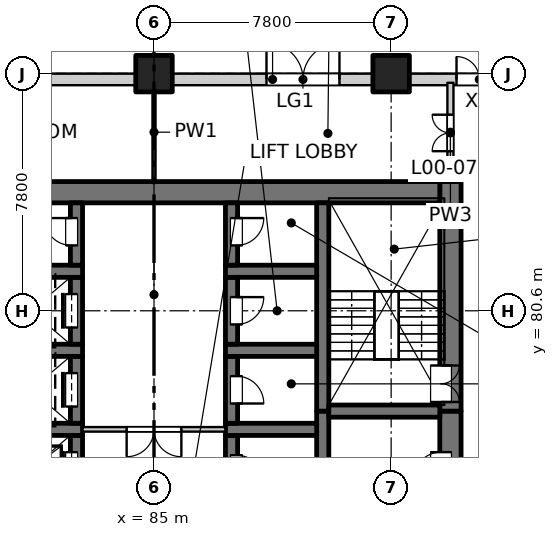
"""IFC4 building model, lengths in metres.
Left out: names, types, materials, properties, quantities, classifications, styles, units other than length and angle.
Written with IfcOpenShell. Run it as: python <this file> out.ifc"""

import sys

from ifc_helpers import new_model, si_unit, direction, frame, frame_2d, origin, origin_2d, place, context, subcontext, project, spatial, rectangle, extrude, element, fill, save


model = new_model("IFC4")
c1 = context("Model", 3, precision=1e-05, world=origin(), true_north=direction((0.0, 1.0)))
c2 = subcontext(c1, "Body", "Model", "MODEL_VIEW")
j1 = project(units=[si_unit("LENGTHUNIT", "METRE"), si_unit("PLANEANGLEUNIT", "RADIAN")], contexts=[c1])
p1 = place(None, origin())
s1 = spatial("IfcSite", under=j1, at=p1, CompositionType="ELEMENT")
p2 = place(p1, origin())
s2 = spatial("IfcBuilding", under=s1, at=p2, CompositionType="ELEMENT")
p3 = place(p2, origin())
s3 = spatial("IfcBuildingStorey", under=s2, at=p3, CompositionType="ELEMENT", Elevation=0.0)
for number, where, z_axis, x_axis in (
    (1, (85.0, 88.4, -0.4), (0.0, 0.0, 1.0), (1.0, 0.0, 0.0)),
    (2, (92.8, 88.4, -0.4), (0.0, 0.0, 1.0), (1.0, 0.0, 0.0)),
):
    element("IfcColumn", number, at=place(p3, frame(where, z_axis=z_axis, x_axis=x_axis)), inside=s3, PredefinedType="COLUMN", context=c2, shape_type="SweptSolid", body=[
        extrude(rectangle(XDim=1.2, YDim=1.2, at=origin_2d()), origin(), (0.0, 0.0, 1.0), 6.1),
    ])
p4 = place(p3, frame((94.75, 61.95, -0.4), z_axis=(0.0, 0.0, 1.0), x_axis=(0.0, 1.0, 0.0)))
e3 = element("IfcWall", 3, at=p4, inside=s3, PredefinedType="SOLIDWALL", context=c2, shape_type="SweptSolid", body=[
    extrude(rectangle(XDim=15.35, YDim=0.7, at=frame_2d((7.675, 0.0))), origin(), (0.0, 0.0, 1.0), 6.1),
])
p5 = place(p4, frame((0.925, 0.0, 0.4)))
e4 = element("IfcOpeningElement", 4, at=p5, cuts=e3, PredefinedType="OPENING", context=c2, shape_type="SweptSolid", body=[
    extrude(rectangle(XDim=0.9, YDim=2.1, at=frame_2d((0.45, 1.05))), frame((0.0, 0.36, 0.0), z_axis=(0.0, -1.0, 0.0), x_axis=(1.0, 0.0, 0.0)), (0.0, 0.0, 1.0), 0.72),
])
p6 = place(p4, frame((6.8, 0.0, 0.4)))
e5 = element("IfcOpeningElement", 5, at=p6, cuts=e3, PredefinedType="OPENING", context=c2, shape_type="SweptSolid", body=[
    extrude(rectangle(XDim=0.9, YDim=2.1, at=frame_2d((0.45, 1.05))), frame((0.0, 0.36, 0.0), z_axis=(0.0, -1.0, 0.0), x_axis=(1.0, 0.0, 0.0)), (0.0, 0.0, 1.0), 0.72),
])
p7 = place(p4, frame((13.1, 0.0, 0.4)))
e6 = element("IfcOpeningElement", 6, at=p7, cuts=e3, PredefinedType="OPENING", context=c2, shape_type="SweptSolid", body=[
    extrude(rectangle(XDim=0.9, YDim=2.1, at=frame_2d((0.45, 1.05))), frame((0.0, 0.36, 0.0), z_axis=(0.0, -1.0, 0.0), x_axis=(1.0, 0.0, 0.0)), (0.0, 0.0, 1.0), 0.72),
])
p8 = place(p3, frame((94.75, 77.3, -0.4), z_axis=(0.0, 0.0, 1.0), x_axis=(0.0, 1.0, 0.0)))
e7 = element("IfcWall", 7, at=p8, inside=s3, PredefinedType="SOLIDWALL", context=c2, shape_type="SweptSolid", body=[
    extrude(rectangle(XDim=7.55, YDim=0.7, at=frame_2d((3.775, 0.0))), origin(), (0.0, 0.0, 1.0), 6.1),
])
p9 = place(p8, frame((0.3, 0.0, 0.4)))
e8 = element("IfcOpeningElement", 8, at=p9, cuts=e7, PredefinedType="OPENING", context=c2, shape_type="SweptSolid", body=[
    extrude(rectangle(XDim=1.2, YDim=2.1, at=frame_2d((0.6, 1.05))), frame((0.0, 0.36, 0.0), z_axis=(0.0, -1.0, 0.0), x_axis=(1.0, 0.0, 0.0)), (0.0, 0.0, 1.0), 0.72),
])
p10 = place(p3, frame((75.6, 84.5, -0.4), z_axis=(0.0, 0.0, 1.0), x_axis=(1.0, 0.0, 0.0)))
e9 = element("IfcWall", 9, at=p10, inside=s3, PredefinedType="SOLIDWALL", context=c2, shape_type="SweptSolid", body=[
    extrude(rectangle(XDim=18.8, YDim=0.7, at=frame_2d((9.4, 0.0))), origin(), (0.0, 0.0, 1.0), 6.1),
])
p11 = place(p3, frame((90.55, 61.95, -0.4), z_axis=(0.0, 0.0, 1.0), x_axis=(0.0, 1.0, 0.0)))
e10 = element("IfcWall", 10, at=p11, inside=s3, PredefinedType="SOLIDWALL", context=c2, shape_type="SweptSolid", body=[
    extrude(rectangle(XDim=15.35, YDim=0.4, at=frame_2d((7.675, 0.0))), origin(), (0.0, 0.0, 1.0), 6.1),
])
p12 = place(p3, frame((90.55, 77.3, -0.4), z_axis=(0.0, 0.0, 1.0), x_axis=(0.0, 1.0, 0.0)))
e11 = element("IfcWall", 11, at=p12, inside=s3, PredefinedType="SOLIDWALL", context=c2, shape_type="SweptSolid", body=[
    extrude(rectangle(XDim=6.85, YDim=0.4, at=frame_2d((3.425, 0.0))), origin(), (0.0, 0.0, 1.0), 6.1),
])
p13 = place(p3, frame((82.45, 74.3, -0.4), z_axis=(0.0, 0.0, 1.0), x_axis=(0.0, 1.0, 0.0)))
e12 = element("IfcWall", 12, at=p13, inside=s3, PredefinedType="SOLIDWALL", context=c2, shape_type="SweptSolid", body=[
    extrude(rectangle(XDim=2.2, YDim=0.4, at=frame_2d((1.1, 0.0))), origin(), (0.0, 0.0, 1.0), 6.1),
])
p14 = place(p13, frame((0.55, 0.0, 0.4)))
e13 = element("IfcOpeningElement", 13, at=p14, cuts=e12, PredefinedType="OPENING", context=c2, shape_type="SweptSolid", body=[
    extrude(rectangle(XDim=1.1, YDim=2.1, at=frame_2d((0.55, 1.05))), frame((0.0, 0.21, 0.0), z_axis=(0.0, -1.0, 0.0), x_axis=(1.0, 0.0, 0.0)), (0.0, 0.0, 1.0), 0.42),
])
p15 = place(p3, frame((79.65, 76.7, -0.4), z_axis=(0.0, 0.0, 1.0), x_axis=(1.0, 0.0, 0.0)))
e14 = element("IfcWall", 14, at=p15, inside=s3, PredefinedType="SOLIDWALL", context=c2, shape_type="SweptSolid", body=[
    extrude(rectangle(XDim=3.0, YDim=0.4, at=frame_2d((1.5, 0.0))), origin(), (0.0, 0.0, 1.0), 6.1),
])
p16 = place(p3, frame((82.45, 76.9, -0.4), z_axis=(0.0, 0.0, 1.0), x_axis=(0.0, 1.0, 0.0)))
e15 = element("IfcWall", 15, at=p16, inside=s3, PredefinedType="SOLIDWALL", context=c2, shape_type="SweptSolid", body=[
    extrude(rectangle(XDim=2.2, YDim=0.4, at=frame_2d((1.1, 0.0))), origin(), (0.0, 0.0, 1.0), 6.1),
])
p17 = place(p16, frame((0.55, 0.0, 0.4)))
e16 = element("IfcOpeningElement", 16, at=p17, cuts=e15, PredefinedType="OPENING", context=c2, shape_type="SweptSolid", body=[
    extrude(rectangle(XDim=1.1, YDim=2.1, at=frame_2d((0.55, 1.05))), frame((0.0, 0.21, 0.0), z_axis=(0.0, -1.0, 0.0), x_axis=(1.0, 0.0, 0.0)), (0.0, 0.0, 1.0), 0.42),
])
p18 = place(p3, frame((79.65, 79.3, -0.4), z_axis=(0.0, 0.0, 1.0), x_axis=(1.0, 0.0, 0.0)))
e17 = element("IfcWall", 17, at=p18, inside=s3, PredefinedType="SOLIDWALL", context=c2, shape_type="SweptSolid", body=[
    extrude(rectangle(XDim=3.0, YDim=0.4, at=frame_2d((1.5, 0.0))), origin(), (0.0, 0.0, 1.0), 6.1),
])
p19 = place(p3, frame((82.45, 79.5, -0.4), z_axis=(0.0, 0.0, 1.0), x_axis=(0.0, 1.0, 0.0)))
e18 = element("IfcWall", 18, at=p19, inside=s3, PredefinedType="SOLIDWALL", context=c2, shape_type="SweptSolid", body=[
    extrude(rectangle(XDim=2.2, YDim=0.4, at=frame_2d((1.1, 0.0))), origin(), (0.0, 0.0, 1.0), 6.1),
])
p20 = place(p19, frame((0.55, 0.0, 0.4)))
e19 = element("IfcOpeningElement", 19, at=p20, cuts=e18, PredefinedType="OPENING", context=c2, shape_type="SweptSolid", body=[
    extrude(rectangle(XDim=1.1, YDim=2.1, at=frame_2d((0.55, 1.05))), frame((0.0, 0.21, 0.0), z_axis=(0.0, -1.0, 0.0), x_axis=(1.0, 0.0, 0.0)), (0.0, 0.0, 1.0), 0.42),
])
p21 = place(p3, frame((79.65, 81.9, -0.4), z_axis=(0.0, 0.0, 1.0), x_axis=(1.0, 0.0, 0.0)))
e20 = element("IfcWall", 20, at=p21, inside=s3, PredefinedType="SOLIDWALL", context=c2, shape_type="SweptSolid", body=[
    extrude(rectangle(XDim=3.0, YDim=0.4, at=frame_2d((1.5, 0.0))), origin(), (0.0, 0.0, 1.0), 6.1),
])
p22 = place(p3, frame((82.45, 82.1, -0.4), z_axis=(0.0, 0.0, 1.0), x_axis=(0.0, 1.0, 0.0)))
e21 = element("IfcWall", 21, at=p22, inside=s3, PredefinedType="SOLIDWALL", context=c2, shape_type="SweptSolid", body=[
    extrude(rectangle(XDim=2.05, YDim=0.4, at=frame_2d((1.025, 0.0))), origin(), (0.0, 0.0, 1.0), 6.1),
])
p23 = place(p22, frame((0.65, 0.0, 0.4)))
e22 = element("IfcOpeningElement", 22, at=p23, cuts=e21, PredefinedType="OPENING", context=c2, shape_type="SweptSolid", body=[
    extrude(rectangle(XDim=0.9, YDim=2.1, at=frame_2d((0.45, 1.05))), frame((0.0, 0.21, 0.0), z_axis=(0.0, -1.0, 0.0), x_axis=(1.0, 0.0, 0.0)), (0.0, 0.0, 1.0), 0.42),
])
p24 = place(p3, frame((87.55, 74.3, -0.4), z_axis=(0.0, 0.0, 1.0), x_axis=(0.0, 1.0, 0.0)))
e23 = element("IfcWall", 23, at=p24, inside=s3, PredefinedType="SOLIDWALL", context=c2, shape_type="SweptSolid", body=[
    extrude(rectangle(XDim=2.2, YDim=0.4, at=frame_2d((1.1, 0.0))), origin(), (0.0, 0.0, 1.0), 6.1),
])
p25 = place(p24, frame((0.65, 0.0, 0.4)))
e24 = element("IfcOpeningElement", 24, at=p25, cuts=e23, PredefinedType="OPENING", context=c2, shape_type="SweptSolid", body=[
    extrude(rectangle(XDim=0.9, YDim=2.1, at=frame_2d((0.45, 1.05))), frame((0.0, 0.21, 0.0), z_axis=(0.0, -1.0, 0.0), x_axis=(1.0, 0.0, 0.0)), (0.0, 0.0, 1.0), 0.42),
])
p26 = place(p3, frame((87.35, 76.7, -0.4), z_axis=(0.0, 0.0, 1.0), x_axis=(1.0, 0.0, 0.0)))
e25 = element("IfcWall", 25, at=p26, inside=s3, PredefinedType="SOLIDWALL", context=c2, shape_type="SweptSolid", body=[
    extrude(rectangle(XDim=3.0, YDim=0.4, at=frame_2d((1.5, 0.0))), origin(), (0.0, 0.0, 1.0), 6.1),
])
p27 = place(p3, frame((87.55, 76.9, -0.4), z_axis=(0.0, 0.0, 1.0), x_axis=(0.0, 1.0, 0.0)))
e26 = element("IfcWall", 26, at=p27, inside=s3, PredefinedType="SOLIDWALL", context=c2, shape_type="SweptSolid", body=[
    extrude(rectangle(XDim=2.2, YDim=0.4, at=frame_2d((1.1, 0.0))), origin(), (0.0, 0.0, 1.0), 6.1),
])
p28 = place(p27, frame((0.65, 0.0, 0.4)))
e27 = element("IfcOpeningElement", 27, at=p28, cuts=e26, PredefinedType="OPENING", context=c2, shape_type="SweptSolid", body=[
    extrude(rectangle(XDim=0.9, YDim=2.1, at=frame_2d((0.45, 1.05))), frame((0.0, 0.21, 0.0), z_axis=(0.0, -1.0, 0.0), x_axis=(1.0, 0.0, 0.0)), (0.0, 0.0, 1.0), 0.42),
])
p29 = place(p3, frame((87.35, 79.3, -0.4), z_axis=(0.0, 0.0, 1.0), x_axis=(1.0, 0.0, 0.0)))
e28 = element("IfcWall", 28, at=p29, inside=s3, PredefinedType="SOLIDWALL", context=c2, shape_type="SweptSolid", body=[
    extrude(rectangle(XDim=3.0, YDim=0.4, at=frame_2d((1.5, 0.0))), origin(), (0.0, 0.0, 1.0), 6.1),
])
p30 = place(p3, frame((87.55, 79.5, -0.4), z_axis=(0.0, 0.0, 1.0), x_axis=(0.0, 1.0, 0.0)))
e29 = element("IfcWall", 29, at=p30, inside=s3, PredefinedType="SOLIDWALL", context=c2, shape_type="SweptSolid", body=[
    extrude(rectangle(XDim=2.2, YDim=0.4, at=frame_2d((1.1, 0.0))), origin(), (0.0, 0.0, 1.0), 6.1),
])
p31 = place(p30, frame((0.65, 0.0, 0.4)))
e30 = element("IfcOpeningElement", 30, at=p31, cuts=e29, PredefinedType="OPENING", context=c2, shape_type="SweptSolid", body=[
    extrude(rectangle(XDim=0.9, YDim=2.1, at=frame_2d((0.45, 1.05))), frame((0.0, 0.21, 0.0), z_axis=(0.0, -1.0, 0.0), x_axis=(1.0, 0.0, 0.0)), (0.0, 0.0, 1.0), 0.42),
])
p32 = place(p3, frame((87.35, 81.9, -0.4), z_axis=(0.0, 0.0, 1.0), x_axis=(1.0, 0.0, 0.0)))
e31 = element("IfcWall", 31, at=p32, inside=s3, PredefinedType="SOLIDWALL", context=c2, shape_type="SweptSolid", body=[
    extrude(rectangle(XDim=3.0, YDim=0.4, at=frame_2d((1.5, 0.0))), origin(), (0.0, 0.0, 1.0), 6.1),
])
p33 = place(p3, frame((87.55, 82.1, -0.4), z_axis=(0.0, 0.0, 1.0), x_axis=(0.0, 1.0, 0.0)))
e32 = element("IfcWall", 32, at=p33, inside=s3, PredefinedType="SOLIDWALL", context=c2, shape_type="SweptSolid", body=[
    extrude(rectangle(XDim=2.05, YDim=0.4, at=frame_2d((1.025, 0.0))), origin(), (0.0, 0.0, 1.0), 6.1),
])
p34 = place(p33, frame((0.65, 0.0, 0.4)))
e33 = element("IfcOpeningElement", 33, at=p34, cuts=e32, PredefinedType="OPENING", context=c2, shape_type="SweptSolid", body=[
    extrude(rectangle(XDim=0.9, YDim=2.1, at=frame_2d((0.45, 1.05))), frame((0.0, 0.21, 0.0), z_axis=(0.0, -1.0, 0.0), x_axis=(1.0, 0.0, 0.0)), (0.0, 0.0, 1.0), 0.42),
])
p35 = place(p3, frame((90.75, 77.3, -0.4), z_axis=(0.0, 0.0, 1.0), x_axis=(1.0, 0.0, 0.0)))
e34 = element("IfcWall", 34, at=p35, inside=s3, PredefinedType="SOLIDWALL", context=c2, shape_type="SweptSolid", body=[
    extrude(rectangle(XDim=3.65, YDim=0.4, at=frame_2d((1.825, 0.0))), origin(), (0.0, 0.0, 1.0), 6.1),
])
p36 = place(p3, frame((77.8, 88.21, 0.0), z_axis=(0.0, 0.0, 1.0), x_axis=(1.0, 0.0, 0.0)))
e35 = element("IfcWall", 35, at=p36, inside=s3, PredefinedType="SOLIDWALL", context=c2, shape_type="SweptSolid", body=[
    extrude(rectangle(XDim=6.6, YDim=0.38, at=frame_2d((3.3, 0.0))), origin(), (0.0, 0.0, 1.0), 5.7),
])
p37 = place(p3, frame((85.6, 88.21, 0.0), z_axis=(0.0, 0.0, 1.0), x_axis=(1.0, 0.0, 0.0)))
e36 = element("IfcWall", 36, at=p37, inside=s3, PredefinedType="SOLIDWALL", context=c2, shape_type="SweptSolid", body=[
    extrude(rectangle(XDim=6.6, YDim=0.38, at=frame_2d((3.3, 0.0))), origin(), (0.0, 0.0, 1.0), 5.7),
])
p38 = place(p37, frame((3.1, 0.0, 0.0)))
e37 = element("IfcOpeningElement", 37, at=p38, cuts=e36, PredefinedType="OPENING", context=c2, shape_type="SweptSolid", body=[
    extrude(rectangle(XDim=2.4, YDim=2.7, at=frame_2d((1.2, 1.35))), frame((0.0, 0.2, 0.0), z_axis=(0.0, -1.0, 0.0), x_axis=(1.0, 0.0, 0.0)), (0.0, 0.0, 1.0), 0.4),
])
p39 = place(p3, frame((93.4, 88.21, 0.0), z_axis=(0.0, 0.0, 1.0), x_axis=(1.0, 0.0, 0.0)))
e38 = element("IfcWall", 38, at=p39, inside=s3, PredefinedType="SOLIDWALL", context=c2, shape_type="SweptSolid", body=[
    extrude(rectangle(XDim=6.6, YDim=0.38, at=frame_2d((3.3, 0.0))), origin(), (0.0, 0.0, 1.0), 5.7),
])
p40 = place(p39, frame((1.55, 0.0, 0.0)))
e39 = element("IfcOpeningElement", 39, at=p40, cuts=e38, PredefinedType="OPENING", context=c2, shape_type="SweptSolid", body=[
    extrude(rectangle(XDim=1.5, YDim=2.4, at=frame_2d((0.75, 1.2))), frame((0.0, 0.2, 0.0), z_axis=(0.0, -1.0, 0.0), x_axis=(1.0, 0.0, 0.0)), (0.0, 0.0, 1.0), 0.4),
])
p41 = place(p3, frame((82.65, 76.7, 0.0), z_axis=(0.0, 0.0, 1.0), x_axis=(1.0, 0.0, 0.0)))
e40 = element("IfcWall", 40, at=p41, inside=s3, PredefinedType="PARTITIONING", context=c2, shape_type="SweptSolid", body=[
    extrude(rectangle(XDim=4.7, YDim=0.15, at=frame_2d((2.35, 0.0))), origin(), (0.0, 0.0, 1.0), 5.7),
])
p42 = place(p41, frame((1.45, 0.0, 0.0)))
e41 = element("IfcOpeningElement", 41, at=p42, cuts=e40, PredefinedType="OPENING", context=c2, shape_type="SweptSolid", body=[
    extrude(rectangle(XDim=1.8, YDim=2.1, at=frame_2d((0.9, 1.05))), frame((0.0, 0.085, 0.0), z_axis=(0.0, -1.0, 0.0), x_axis=(1.0, 0.0, 0.0)), (0.0, 0.0, 1.0), 0.17),
])
p43 = place(p3, frame((85.0, 84.85, 0.0), z_axis=(0.0, 0.0, 1.0), x_axis=(0.0, 1.0, 0.0)))
e42 = element("IfcWall", 42, at=p43, inside=s3, PredefinedType="PARTITIONING", context=c2, shape_type="SweptSolid", body=[
    extrude(rectangle(XDim=3.25, YDim=0.1, at=frame_2d((1.625, 0.0))), origin(), (0.0, 0.0, 1.0), 5.7),
])
p44 = place(p3, frame((94.75, 84.85, 0.0), z_axis=(0.0, 0.0, 1.0), x_axis=(0.0, 1.0, 0.0)))
e43 = element("IfcWall", 43, at=p44, inside=s3, PredefinedType="PARTITIONING", context=c2, shape_type="SweptSolid", body=[
    extrude(rectangle(XDim=3.25, YDim=0.2, at=frame_2d((1.625, 0.0))), origin(), (0.0, 0.0, 1.0), 5.7),
])
p45 = place(p44, frame((1.0, 0.0, 0.0)))
e44 = element("IfcOpeningElement", 44, at=p45, cuts=e43, PredefinedType="OPENING", context=c2, shape_type="SweptSolid", body=[
    extrude(rectangle(XDim=1.2, YDim=2.1, at=frame_2d((0.6, 1.05))), frame((0.0, 0.11, 0.0), z_axis=(0.0, -1.0, 0.0), x_axis=(1.0, 0.0, 0.0)), (0.0, 0.0, 1.0), 0.22),
])
p46 = place(p38, origin())
e45 = element("IfcDoor", 45, at=p46, inside=s3, OperationType="DOUBLE_DOOR_SINGLE_SWING", PredefinedType="DOOR", context=c2, shape_type="SweptSolid", body=[
    extrude(rectangle(XDim=2.4, YDim=2.7, at=frame_2d((1.2, 1.35))), frame((0.0, 0.025, 0.0), z_axis=(0.0, -1.0, 0.0), x_axis=(1.0, 0.0, 0.0)), (0.0, 0.0, 1.0), 0.05),
])
fill(e37, e45)
p47 = place(p40, origin())
e46 = element("IfcDoor", 46, at=p47, inside=s3, OperationType="DOUBLE_DOOR_SINGLE_SWING", PredefinedType="DOOR", context=c2, shape_type="SweptSolid", body=[
    extrude(rectangle(XDim=1.5, YDim=2.4, at=frame_2d((0.75, 1.2))), frame((0.0, 0.025, 0.0), z_axis=(0.0, -1.0, 0.0), x_axis=(1.0, 0.0, 0.0)), (0.0, 0.0, 1.0), 0.05),
])
fill(e39, e46)
p48 = place(p14, origin())
e47 = element("IfcDoor", 47, at=p48, inside=s3, OperationType="SLIDING_TO_LEFT", PredefinedType="DOOR", context=c2, shape_type="SweptSolid", body=[
    extrude(rectangle(XDim=1.1, YDim=2.1, at=frame_2d((0.55, 1.05))), frame((0.0, 0.185, 0.0), z_axis=(0.0, -1.0, 0.0), x_axis=(1.0, 0.0, 0.0)), (0.0, 0.0, 1.0), 0.05),
])
fill(e13, e47)
p49 = place(p25, origin())
e48 = element("IfcDoor", 48, at=p49, inside=s3, OperationType="SINGLE_SWING_RIGHT", PredefinedType="DOOR", context=c2, shape_type="SweptSolid", body=[
    extrude(rectangle(XDim=0.9, YDim=2.1, at=frame_2d((0.45, 1.05))), frame((0.0, -0.135, 0.0), z_axis=(0.0, -1.0, 0.0), x_axis=(1.0, 0.0, 0.0)), (0.0, 0.0, 1.0), 0.05),
])
fill(e24, e48)
p50 = place(p7, origin())
e49 = element("IfcDoor", 49, at=p50, inside=s3, OperationType="SINGLE_SWING_LEFT", PredefinedType="DOOR", context=c2, shape_type="SweptSolid", body=[
    extrude(rectangle(XDim=0.9, YDim=2.1, at=frame_2d((0.45, 1.05))), frame((0.0, 0.335, 0.0), z_axis=(0.0, -1.0, 0.0), x_axis=(1.0, 0.0, 0.0)), (0.0, 0.0, 1.0), 0.05),
])
fill(e6, e49)
p51 = place(p42, origin())
e50 = element("IfcDoor", 50, at=p51, inside=s3, OperationType="DOUBLE_DOOR_SINGLE_SWING", PredefinedType="DOOR", context=c2, shape_type="SweptSolid", body=[
    extrude(rectangle(XDim=1.8, YDim=2.1, at=frame_2d((0.9, 1.05))), frame((0.0, 0.025, 0.0), z_axis=(0.0, -1.0, 0.0), x_axis=(1.0, 0.0, 0.0)), (0.0, 0.0, 1.0), 0.05),
])
fill(e41, e50)
p52 = place(p17, origin())
e51 = element("IfcDoor", 51, at=p52, inside=s3, OperationType="SLIDING_TO_LEFT", PredefinedType="DOOR", context=c2, shape_type="SweptSolid", body=[
    extrude(rectangle(XDim=1.1, YDim=2.1, at=frame_2d((0.55, 1.05))), frame((0.0, 0.185, 0.0), z_axis=(0.0, -1.0, 0.0), x_axis=(1.0, 0.0, 0.0)), (0.0, 0.0, 1.0), 0.05),
])
fill(e16, e51)
p53 = place(p28, origin())
e52 = element("IfcDoor", 52, at=p53, inside=s3, OperationType="SINGLE_SWING_RIGHT", PredefinedType="DOOR", context=c2, shape_type="SweptSolid", body=[
    extrude(rectangle(XDim=0.9, YDim=2.1, at=frame_2d((0.45, 1.05))), frame((0.0, -0.135, 0.0), z_axis=(0.0, -1.0, 0.0), x_axis=(1.0, 0.0, 0.0)), (0.0, 0.0, 1.0), 0.05),
])
fill(e27, e52)
p54 = place(p9, frame((1.2, 0.0, 0.0), z_axis=(0.0, 0.0, 1.0), x_axis=(-1.0, 0.0, 0.0)))
e53 = element("IfcDoor", 53, at=p54, inside=s3, OperationType="DOUBLE_DOOR_SINGLE_SWING", PredefinedType="DOOR", context=c2, shape_type="SweptSolid", body=[
    extrude(rectangle(XDim=1.2, YDim=2.1, at=frame_2d((0.6, 1.05))), frame((0.0, -0.285, 0.0), z_axis=(0.0, -1.0, 0.0), x_axis=(1.0, 0.0, 0.0)), (0.0, 0.0, 1.0), 0.05),
])
fill(e8, e53)
p55 = place(p20, origin())
e54 = element("IfcDoor", 54, at=p55, inside=s3, OperationType="SLIDING_TO_LEFT", PredefinedType="DOOR", context=c2, shape_type="SweptSolid", body=[
    extrude(rectangle(XDim=1.1, YDim=2.1, at=frame_2d((0.55, 1.05))), frame((0.0, 0.185, 0.0), z_axis=(0.0, -1.0, 0.0), x_axis=(1.0, 0.0, 0.0)), (0.0, 0.0, 1.0), 0.05),
])
fill(e19, e54)
p56 = place(p31, origin())
e55 = element("IfcDoor", 55, at=p56, inside=s3, OperationType="SINGLE_SWING_LEFT", PredefinedType="DOOR", context=c2, shape_type="SweptSolid", body=[
    extrude(rectangle(XDim=0.9, YDim=2.1, at=frame_2d((0.45, 1.05))), frame((0.0, -0.135, 0.0), z_axis=(0.0, -1.0, 0.0), x_axis=(1.0, 0.0, 0.0)), (0.0, 0.0, 1.0), 0.05),
])
fill(e30, e55)
p57 = place(p23, origin())
e56 = element("IfcDoor", 56, at=p57, inside=s3, OperationType="SINGLE_SWING_RIGHT", PredefinedType="DOOR", context=c2, shape_type="SweptSolid", body=[
    extrude(rectangle(XDim=0.9, YDim=2.1, at=frame_2d((0.45, 1.05))), frame((0.0, 0.185, 0.0), z_axis=(0.0, -1.0, 0.0), x_axis=(1.0, 0.0, 0.0)), (0.0, 0.0, 1.0), 0.05),
])
fill(e22, e56)
p58 = place(p34, origin())
e57 = element("IfcDoor", 57, at=p58, inside=s3, OperationType="SINGLE_SWING_LEFT", PredefinedType="DOOR", context=c2, shape_type="SweptSolid", body=[
    extrude(rectangle(XDim=0.9, YDim=2.1, at=frame_2d((0.45, 1.05))), frame((0.0, -0.135, 0.0), z_axis=(0.0, -1.0, 0.0), x_axis=(1.0, 0.0, 0.0)), (0.0, 0.0, 1.0), 0.05),
])
fill(e33, e57)
p59 = place(p45, origin())
e58 = element("IfcDoor", 58, at=p59, inside=s3, OperationType="DOUBLE_DOOR_SINGLE_SWING", PredefinedType="DOOR", context=c2, shape_type="SweptSolid", body=[
    extrude(rectangle(XDim=1.2, YDim=2.1, at=frame_2d((0.6, 1.05))), frame((0.0, 0.025, 0.0), z_axis=(0.0, -1.0, 0.0), x_axis=(1.0, 0.0, 0.0)), (0.0, 0.0, 1.0), 0.05),
])
fill(e44, e58)
save(model, sys.argv[1])
